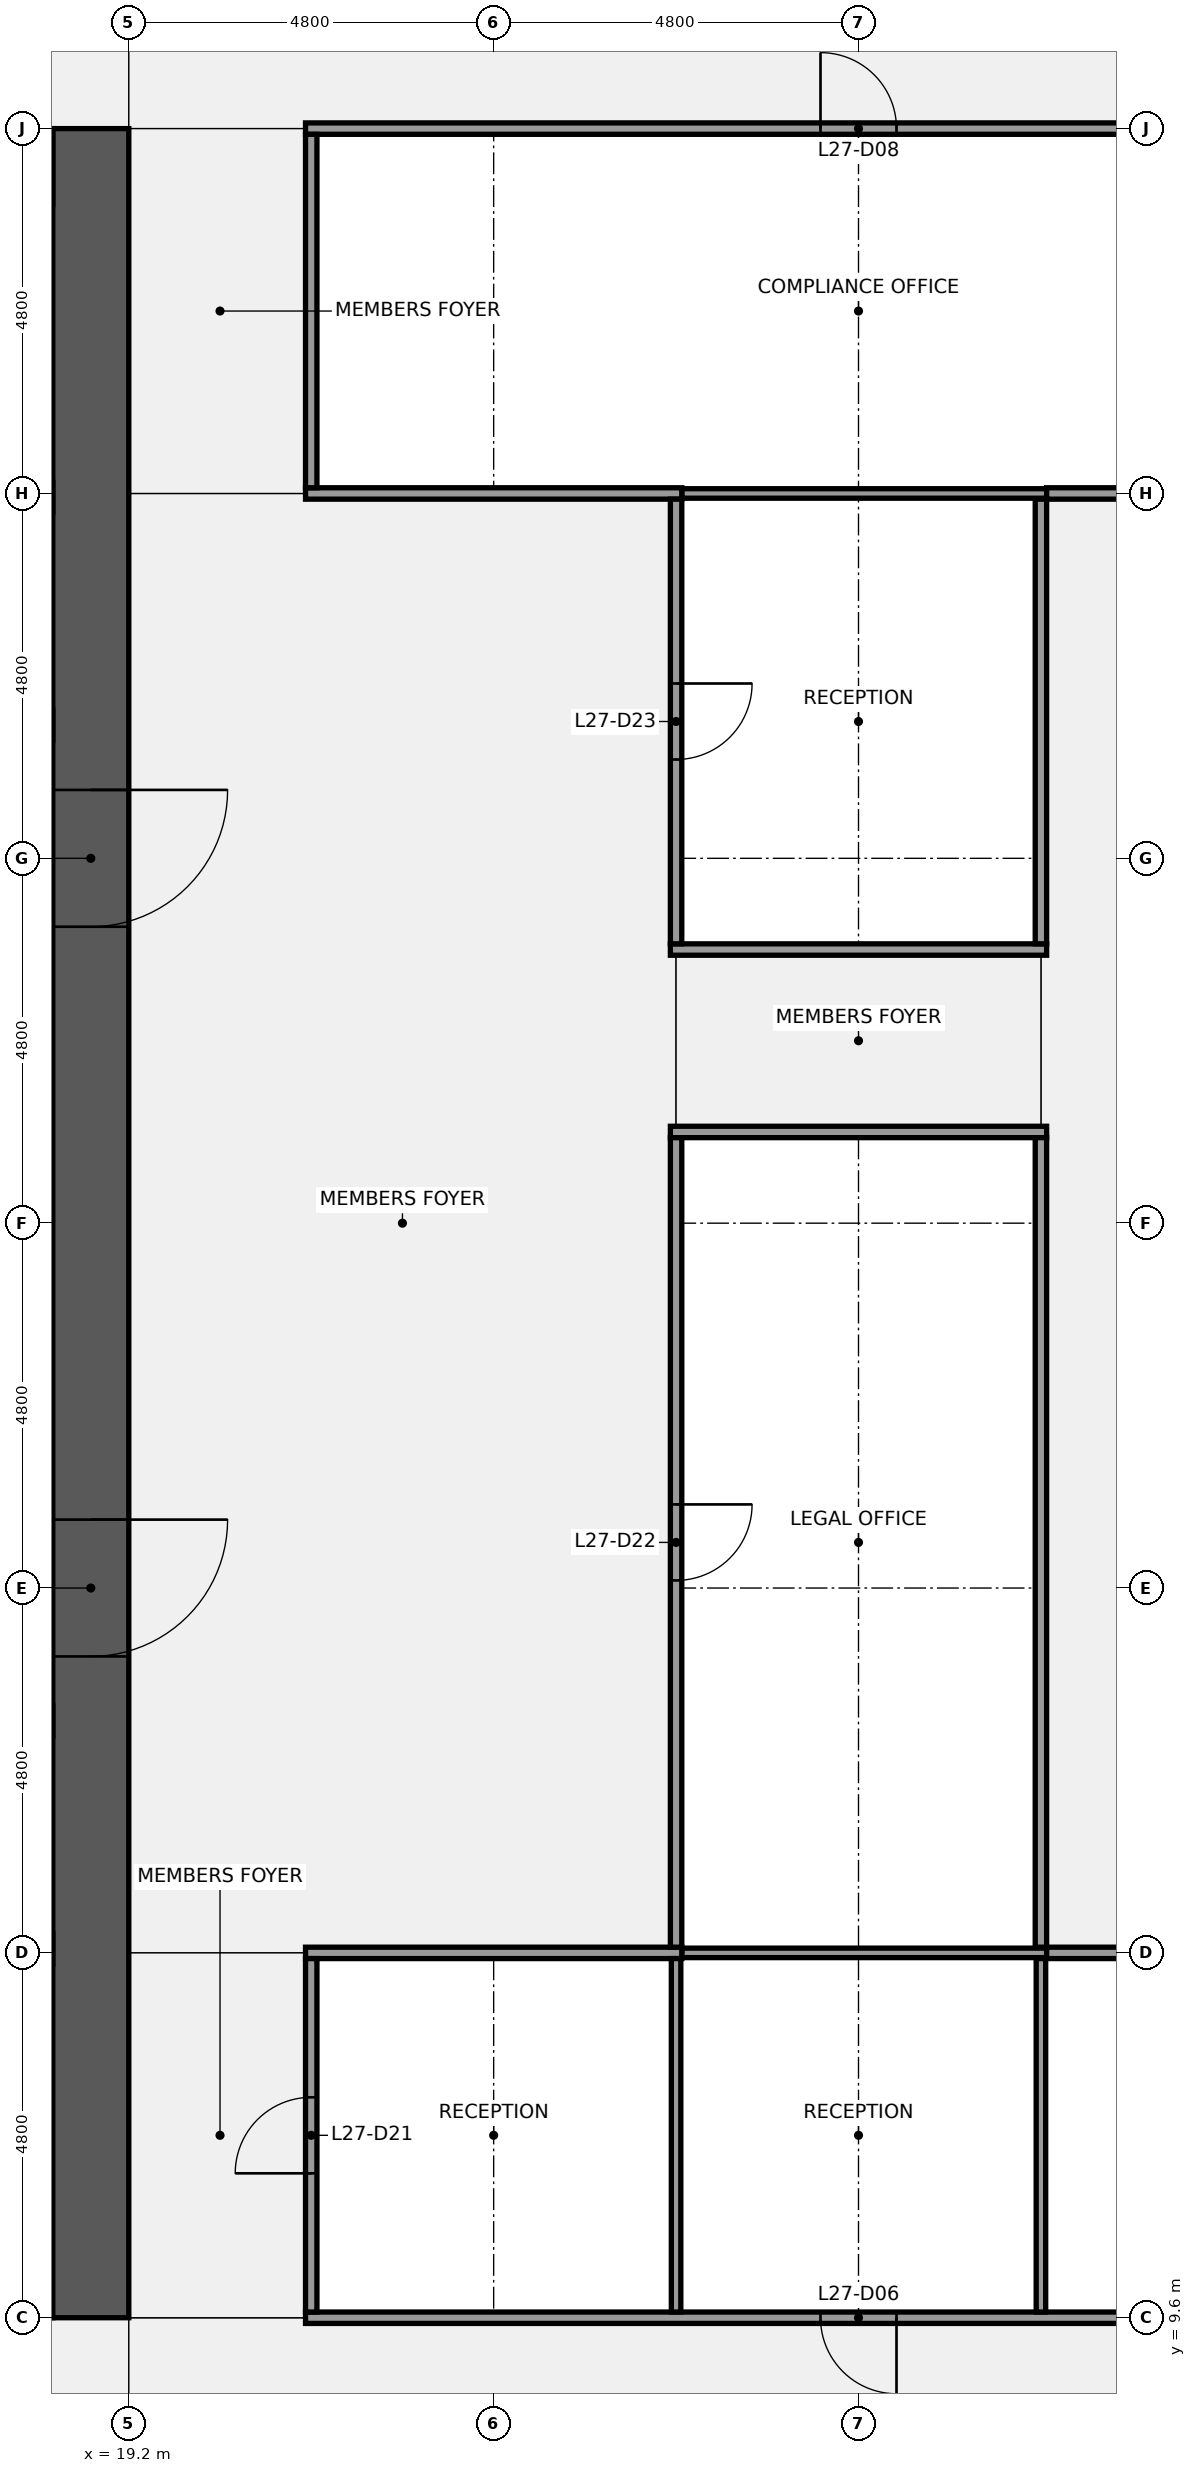
"""IFC4 building model, lengths in metres.
Left out: names, types, materials, properties, quantities, classifications, styles, units other than length and angle.
Written with IfcOpenShell. Run it as: python <this file> out.ifc"""

import sys

from ifc_helpers import new_model, si_unit, direction, frame, frame_2d, origin, place, context, subcontext, project, spatial, rectangle, extrude, element, fill, save


model = new_model("IFC4")
c1 = context("Model", 3, precision=1e-05, world=origin(), true_north=direction((0.0, 1.0)))
c2 = subcontext(c1, "Body", "Model", "MODEL_VIEW")
j1 = project(units=[si_unit("LENGTHUNIT", "METRE"), si_unit("PLANEANGLEUNIT", "RADIAN")], contexts=[c1])
p1 = place(None, origin())
s1 = spatial("IfcSite", under=j1, at=p1, CompositionType="ELEMENT")
p2 = place(p1, origin())
s2 = spatial("IfcBuilding", under=s1, at=p2, CompositionType="ELEMENT")
p3 = place(p2, frame((0.0, 0.0, 128.1)))
s3 = spatial("IfcBuildingStorey", under=s2, at=p3, CompositionType="ELEMENT", Elevation=128.1)
p4 = place(p3, frame((18.2, 10.1, 0.0), z_axis=(0.0, 0.0, 1.0), x_axis=(-1.0, 0.0, 0.0)))
e1 = element("IfcWall", 1, at=p4, inside=s3, PredefinedType="SHEAR", context=c2, shape_type="SweptSolid", body=[
    extrude(rectangle(XDim=8.6, YDim=1.0, at=frame_2d((4.3, 0.0))), origin(), (0.0, 0.0, 1.0), 3.84),
])
p5 = place(p4, frame((0.85, 0.0, 0.0)))
e2 = element("IfcOpeningElement", 2, at=p5, cuts=e1, PredefinedType="OPENING", context=c2, shape_type="SweptSolid", body=[
    extrude(rectangle(XDim=1.1, YDim=2.1, at=frame_2d((0.55, 1.05))), frame((0.0, 0.51, 0.0), z_axis=(0.0, -1.0, 0.0), x_axis=(1.0, 0.0, 0.0)), (0.0, 0.0, 1.0), 1.02),
])
p6 = place(p3, frame((18.7, 38.4, 0.0), z_axis=(0.0, 0.0, 1.0), x_axis=(0.0, -1.0, 0.0)))
e3 = element("IfcWall", 3, at=p6, inside=s3, PredefinedType="SHEAR", context=c2, shape_type="SweptSolid", body=[
    extrude(rectangle(XDim=28.8, YDim=1.0, at=frame_2d((14.4, 0.0))), origin(), (0.0, 0.0, 1.0), 3.84),
])
p7 = place(p6, frame((18.3, 0.0, 0.0)))
e4 = element("IfcOpeningElement", 4, at=p7, cuts=e3, PredefinedType="OPENING", context=c2, shape_type="SweptSolid", body=[
    extrude(rectangle(XDim=1.8, YDim=2.1, at=frame_2d((0.9, 1.05))), frame((0.0, 0.51, 0.0), z_axis=(0.0, -1.0, 0.0), x_axis=(1.0, 0.0, 0.0)), (0.0, 0.0, 1.0), 1.02),
])
p8 = place(p6, frame((8.7, 0.0, 0.0)))
e5 = element("IfcOpeningElement", 5, at=p8, cuts=e3, PredefinedType="OPENING", context=c2, shape_type="SweptSolid", body=[
    extrude(rectangle(XDim=1.8, YDim=2.1, at=frame_2d((0.9, 1.05))), frame((0.0, 0.51, 0.0), z_axis=(0.0, -1.0, 0.0), x_axis=(1.0, 0.0, 0.0)), (0.0, 0.0, 1.0), 1.02),
])
p9 = place(p3, frame((1.0, 14.45, 0.0), z_axis=(0.0, 0.0, 1.0), x_axis=(1.0, 0.0, 0.0)))
e6 = element("IfcWall", 6, at=p9, inside=s3, PredefinedType="SHEAR", context=c2, shape_type="SweptSolid", body=[
    extrude(rectangle(XDim=17.2, YDim=0.4, at=frame_2d((8.6, 0.0))), origin(), (0.0, 0.0, 1.0), 3.84),
])
p10 = place(p3, frame((1.0, 17.45, 0.0), z_axis=(0.0, 0.0, 1.0), x_axis=(1.0, 0.0, 0.0)))
e7 = element("IfcWall", 7, at=p10, inside=s3, PredefinedType="SHEAR", context=c2, shape_type="SweptSolid", body=[
    extrude(rectangle(XDim=17.2, YDim=0.4, at=frame_2d((8.6, 0.0))), origin(), (0.0, 0.0, 1.0), 3.84),
])
p11 = place(p10, frame((0.762, 0.0, 0.0)))
e8 = element("IfcOpeningElement", 8, at=p11, cuts=e7, PredefinedType="OPENING", context=c2, shape_type="SweptSolid", body=[
    extrude(rectangle(XDim=1.0, YDim=2.1, at=frame_2d((0.5, 1.05))), frame((0.0, 0.21, 0.0), z_axis=(0.0, -1.0, 0.0), x_axis=(1.0, 0.0, 0.0)), (0.0, 0.0, 1.0), 0.42),
])
p12 = place(p10, frame((4.5, 0.0, 0.0)))
e9 = element("IfcOpeningElement", 9, at=p12, cuts=e7, PredefinedType="OPENING", context=c2, shape_type="SweptSolid", body=[
    extrude(rectangle(XDim=1.0, YDim=2.1, at=frame_2d((0.5, 1.05))), frame((0.0, 0.21, 0.0), z_axis=(0.0, -1.0, 0.0), x_axis=(1.0, 0.0, 0.0)), (0.0, 0.0, 1.0), 0.42),
])
p13 = place(p10, frame((8.4, 0.0, 0.0)))
e10 = element("IfcOpeningElement", 10, at=p13, cuts=e7, PredefinedType="OPENING", context=c2, shape_type="SweptSolid", body=[
    extrude(rectangle(XDim=1.0, YDim=2.1, at=frame_2d((0.5, 1.05))), frame((0.0, 0.21, 0.0), z_axis=(0.0, -1.0, 0.0), x_axis=(1.0, 0.0, 0.0)), (0.0, 0.0, 1.0), 0.42),
])
p14 = place(p10, frame((11.4, 0.0, 0.0)))
e11 = element("IfcOpeningElement", 11, at=p14, cuts=e7, PredefinedType="OPENING", context=c2, shape_type="SweptSolid", body=[
    extrude(rectangle(XDim=1.0, YDim=2.1, at=frame_2d((0.5, 1.05))), frame((0.0, 0.21, 0.0), z_axis=(0.0, -1.0, 0.0), x_axis=(1.0, 0.0, 0.0)), (0.0, 0.0, 1.0), 0.42),
])
p15 = place(p10, frame((14.837, 0.0, 0.0)))
e12 = element("IfcOpeningElement", 12, at=p15, cuts=e7, PredefinedType="OPENING", context=c2, shape_type="SweptSolid", body=[
    extrude(rectangle(XDim=1.0, YDim=2.1, at=frame_2d((0.5, 1.05))), frame((0.0, 0.21, 0.0), z_axis=(0.0, -1.0, 0.0), x_axis=(1.0, 0.0, 0.0)), (0.0, 0.0, 1.0), 0.42),
])
p16 = place(p3, frame((1.0, 30.55, 0.0), z_axis=(0.0, 0.0, 1.0), x_axis=(1.0, 0.0, 0.0)))
e13 = element("IfcWall", 13, at=p16, inside=s3, PredefinedType="SHEAR", context=c2, shape_type="SweptSolid", body=[
    extrude(rectangle(XDim=17.2, YDim=0.4, at=frame_2d((8.6, 0.0))), origin(), (0.0, 0.0, 1.0), 3.84),
])
p17 = place(p16, frame((1.663, 0.0, 0.0)))
e14 = element("IfcOpeningElement", 14, at=p17, cuts=e13, PredefinedType="OPENING", context=c2, shape_type="SweptSolid", body=[
    extrude(rectangle(XDim=1.0, YDim=2.1, at=frame_2d((0.5, 1.05))), frame((0.0, 0.21, 0.0), z_axis=(0.0, -1.0, 0.0), x_axis=(1.0, 0.0, 0.0)), (0.0, 0.0, 1.0), 0.42),
])
p18 = place(p16, frame((5.7, 0.0, 0.0)))
e15 = element("IfcOpeningElement", 15, at=p18, cuts=e13, PredefinedType="OPENING", context=c2, shape_type="SweptSolid", body=[
    extrude(rectangle(XDim=1.0, YDim=2.1, at=frame_2d((0.5, 1.05))), frame((0.0, 0.21, 0.0), z_axis=(0.0, -1.0, 0.0), x_axis=(1.0, 0.0, 0.0)), (0.0, 0.0, 1.0), 0.42),
])
p19 = place(p16, frame((9.0, 0.0, 0.0)))
e16 = element("IfcOpeningElement", 16, at=p19, cuts=e13, PredefinedType="OPENING", context=c2, shape_type="SweptSolid", body=[
    extrude(rectangle(XDim=1.0, YDim=2.1, at=frame_2d((0.5, 1.05))), frame((0.0, 0.21, 0.0), z_axis=(0.0, -1.0, 0.0), x_axis=(1.0, 0.0, 0.0)), (0.0, 0.0, 1.0), 0.42),
])
p20 = place(p16, frame((11.7, 0.0, 0.0)))
e17 = element("IfcOpeningElement", 17, at=p20, cuts=e13, PredefinedType="OPENING", context=c2, shape_type="SweptSolid", body=[
    extrude(rectangle(XDim=1.0, YDim=2.1, at=frame_2d((0.5, 1.05))), frame((0.0, 0.21, 0.0), z_axis=(0.0, -1.0, 0.0), x_axis=(1.0, 0.0, 0.0)), (0.0, 0.0, 1.0), 0.42),
])
p21 = place(p16, frame((14.837, 0.0, 0.0)))
e18 = element("IfcOpeningElement", 18, at=p21, cuts=e13, PredefinedType="OPENING", context=c2, shape_type="SweptSolid", body=[
    extrude(rectangle(XDim=1.0, YDim=2.1, at=frame_2d((0.5, 1.05))), frame((0.0, 0.21, 0.0), z_axis=(0.0, -1.0, 0.0), x_axis=(1.0, 0.0, 0.0)), (0.0, 0.0, 1.0), 0.42),
])
p22 = place(p3, frame((1.0, 33.55, 0.0), z_axis=(0.0, 0.0, 1.0), x_axis=(1.0, 0.0, 0.0)))
e19 = element("IfcWall", 19, at=p22, inside=s3, PredefinedType="SHEAR", context=c2, shape_type="SweptSolid", body=[
    extrude(rectangle(XDim=17.2, YDim=0.4, at=frame_2d((8.6, 0.0))), origin(), (0.0, 0.0, 1.0), 3.84),
])
p23 = place(p3, frame((21.525, 9.6, 0.0), z_axis=(0.0, 0.0, 1.0), x_axis=(1.0, 0.0, 0.0)))
e20 = element("IfcWall", 20, at=p23, inside=s3, PredefinedType="PARTITIONING", context=c2, shape_type="SweptSolid", body=[
    extrude(rectangle(XDim=14.55, YDim=0.15, at=frame_2d((7.275, 0.0))), origin(), (0.0, 0.0, 1.0), 2.936),
])
p24 = place(p23, frame((6.775, 0.0, 0.0)))
e21 = element("IfcOpeningElement", 21, at=p24, cuts=e20, PredefinedType="OPENING", context=c2, shape_type="SweptSolid", body=[
    extrude(rectangle(XDim=1.0, YDim=2.1, at=frame_2d((0.5, 1.05))), frame((0.0, 0.085, 0.0), z_axis=(0.0, -1.0, 0.0), x_axis=(1.0, 0.0, 0.0)), (0.0, 0.0, 1.0), 0.17),
])
p25 = place(p23, frame((11.575, 0.0, 0.0)))
e22 = element("IfcOpeningElement", 22, at=p25, cuts=e20, PredefinedType="OPENING", context=c2, shape_type="SweptSolid", body=[
    extrude(rectangle(XDim=1.0, YDim=2.1, at=frame_2d((0.5, 1.05))), frame((0.0, 0.085, 0.0), z_axis=(0.0, -1.0, 0.0), x_axis=(1.0, 0.0, 0.0)), (0.0, 0.0, 1.0), 0.17),
])
p26 = place(p3, frame((26.475, 14.4, 0.0), z_axis=(0.0, 0.0, 1.0), x_axis=(1.0, 0.0, 0.0)))
e23 = element("IfcWall", 23, at=p26, inside=s3, PredefinedType="PARTITIONING", context=c2, shape_type="SweptSolid", body=[
    extrude(rectangle(XDim=4.8, YDim=0.125, at=frame_2d((2.4, 0.0))), origin(), (0.0, 0.0, 1.0), 2.936),
])
p27 = place(p3, frame((21.525, 14.4, 0.0), z_axis=(0.0, 0.0, 1.0), x_axis=(1.0, 0.0, 0.0)))
e24 = element("IfcWall", 24, at=p27, inside=s3, PredefinedType="PARTITIONING", context=c2, shape_type="SweptSolid", body=[
    extrude(rectangle(XDim=4.95, YDim=0.15, at=frame_2d((2.475, 0.0))), origin(), (0.0, 0.0, 1.0), 2.936),
])
p28 = place(p3, frame((31.275, 14.4, 0.0), z_axis=(0.0, 0.0, 1.0), x_axis=(1.0, 0.0, 0.0)))
e25 = element("IfcWall", 25, at=p28, inside=s3, PredefinedType="PARTITIONING", context=c2, shape_type="SweptSolid", body=[
    extrude(rectangle(XDim=4.8, YDim=0.15, at=frame_2d((2.4, 0.0))), origin(), (0.0, 0.0, 1.0), 2.936),
])
for number, where, z_axis, x_axis in (
    (26, (26.325, 25.2, 0.0), (0.0, 0.0, 1.0), (1.0, 0.0, 0.0)),
    (27, (26.325, 27.6, 0.0), (0.0, 0.0, 1.0), (1.0, 0.0, 0.0)),
):
    element("IfcWall", number, at=place(p3, frame(where, z_axis=z_axis, x_axis=x_axis)), inside=s3, PredefinedType="PARTITIONING", context=c2, shape_type="SweptSolid", body=[
        extrude(rectangle(XDim=4.95, YDim=0.15, at=frame_2d((2.475, 0.0))), origin(), (0.0, 0.0, 1.0), 2.936),
    ])
p29 = place(p3, frame((26.475, 33.6, 0.0), z_axis=(0.0, 0.0, 1.0), x_axis=(1.0, 0.0, 0.0)))
e28 = element("IfcWall", 28, at=p29, inside=s3, PredefinedType="PARTITIONING", context=c2, shape_type="SweptSolid", body=[
    extrude(rectangle(XDim=4.8, YDim=0.125, at=frame_2d((2.4, 0.0))), origin(), (0.0, 0.0, 1.0), 2.936),
])
p30 = place(p3, frame((21.525, 33.6, 0.0), z_axis=(0.0, 0.0, 1.0), x_axis=(1.0, 0.0, 0.0)))
e29 = element("IfcWall", 29, at=p30, inside=s3, PredefinedType="PARTITIONING", context=c2, shape_type="SweptSolid", body=[
    extrude(rectangle(XDim=4.95, YDim=0.15, at=frame_2d((2.475, 0.0))), origin(), (0.0, 0.0, 1.0), 2.936),
])
p31 = place(p3, frame((31.275, 33.6, 0.0), z_axis=(0.0, 0.0, 1.0), x_axis=(1.0, 0.0, 0.0)))
e30 = element("IfcWall", 30, at=p31, inside=s3, PredefinedType="PARTITIONING", context=c2, shape_type="SweptSolid", body=[
    extrude(rectangle(XDim=4.8, YDim=0.15, at=frame_2d((2.4, 0.0))), origin(), (0.0, 0.0, 1.0), 2.936),
])
p32 = place(p3, frame((21.525, 38.4, 0.0), z_axis=(0.0, 0.0, 1.0), x_axis=(1.0, 0.0, 0.0)))
e31 = element("IfcWall", 31, at=p32, inside=s3, PredefinedType="PARTITIONING", context=c2, shape_type="SweptSolid", body=[
    extrude(rectangle(XDim=14.55, YDim=0.15, at=frame_2d((7.275, 0.0))), origin(), (0.0, 0.0, 1.0), 2.936),
])
p33 = place(p32, frame((6.775, 0.0, 0.0)))
e32 = element("IfcOpeningElement", 32, at=p33, cuts=e31, PredefinedType="OPENING", context=c2, shape_type="SweptSolid", body=[
    extrude(rectangle(XDim=1.0, YDim=2.1, at=frame_2d((0.5, 1.05))), frame((0.0, 0.085, 0.0), z_axis=(0.0, -1.0, 0.0), x_axis=(1.0, 0.0, 0.0)), (0.0, 0.0, 1.0), 0.17),
])
p34 = place(p3, frame((21.6, 9.675, 0.0), z_axis=(0.0, 0.0, 1.0), x_axis=(0.0, 1.0, 0.0)))
e33 = element("IfcWall", 33, at=p34, inside=s3, PredefinedType="PARTITIONING", context=c2, shape_type="SweptSolid", body=[
    extrude(rectangle(XDim=4.65, YDim=0.15, at=frame_2d((2.325, 0.0))), origin(), (0.0, 0.0, 1.0), 2.936),
])
p35 = place(p34, frame((1.825, 0.0, 0.0)))
e34 = element("IfcOpeningElement", 34, at=p35, cuts=e33, PredefinedType="OPENING", context=c2, shape_type="SweptSolid", body=[
    extrude(rectangle(XDim=1.0, YDim=2.1, at=frame_2d((0.5, 1.05))), frame((0.0, 0.085, 0.0), z_axis=(0.0, -1.0, 0.0), x_axis=(1.0, 0.0, 0.0)), (0.0, 0.0, 1.0), 0.17),
])
p36 = place(p3, frame((21.6, 33.675, 0.0), z_axis=(0.0, 0.0, 1.0), x_axis=(0.0, 1.0, 0.0)))
e35 = element("IfcWall", 35, at=p36, inside=s3, PredefinedType="PARTITIONING", context=c2, shape_type="SweptSolid", body=[
    extrude(rectangle(XDim=4.65, YDim=0.15, at=frame_2d((2.325, 0.0))), origin(), (0.0, 0.0, 1.0), 2.936),
])
p37 = place(p3, frame((26.4, 9.675, 0.0), z_axis=(0.0, 0.0, 1.0), x_axis=(0.0, 1.0, 0.0)))
e36 = element("IfcWall", 36, at=p37, inside=s3, PredefinedType="PARTITIONING", context=c2, shape_type="SweptSolid", body=[
    extrude(rectangle(XDim=4.65, YDim=0.125, at=frame_2d((2.325, 0.0))), origin(), (0.0, 0.0, 1.0), 2.936),
])
p38 = place(p3, frame((26.4, 14.475, 0.0), z_axis=(0.0, 0.0, 1.0), x_axis=(0.0, 1.0, 0.0)))
e37 = element("IfcWall", 37, at=p38, inside=s3, PredefinedType="PARTITIONING", context=c2, shape_type="SweptSolid", body=[
    extrude(rectangle(XDim=10.65, YDim=0.15, at=frame_2d((5.325, 0.0))), origin(), (0.0, 0.0, 1.0), 2.936),
])
p39 = place(p38, frame((4.825, 0.0, 0.0)))
e38 = element("IfcOpeningElement", 38, at=p39, cuts=e37, PredefinedType="OPENING", context=c2, shape_type="SweptSolid", body=[
    extrude(rectangle(XDim=1.0, YDim=2.1, at=frame_2d((0.5, 1.05))), frame((0.0, 0.085, 0.0), z_axis=(0.0, -1.0, 0.0), x_axis=(1.0, 0.0, 0.0)), (0.0, 0.0, 1.0), 0.17),
])
p40 = place(p3, frame((26.4, 27.675, 0.0), z_axis=(0.0, 0.0, 1.0), x_axis=(0.0, 1.0, 0.0)))
e39 = element("IfcWall", 39, at=p40, inside=s3, PredefinedType="PARTITIONING", context=c2, shape_type="SweptSolid", body=[
    extrude(rectangle(XDim=5.85, YDim=0.15, at=frame_2d((2.925, 0.0))), origin(), (0.0, 0.0, 1.0), 2.936),
])
p41 = place(p40, frame((2.425, 0.0, 0.0)))
e40 = element("IfcOpeningElement", 40, at=p41, cuts=e39, PredefinedType="OPENING", context=c2, shape_type="SweptSolid", body=[
    extrude(rectangle(XDim=1.0, YDim=2.1, at=frame_2d((0.5, 1.05))), frame((0.0, 0.085, 0.0), z_axis=(0.0, -1.0, 0.0), x_axis=(1.0, 0.0, 0.0)), (0.0, 0.0, 1.0), 0.17),
])
p42 = place(p3, frame((31.2, 9.675, 0.0), z_axis=(0.0, 0.0, 1.0), x_axis=(0.0, 1.0, 0.0)))
e41 = element("IfcWall", 41, at=p42, inside=s3, PredefinedType="PARTITIONING", context=c2, shape_type="SweptSolid", body=[
    extrude(rectangle(XDim=4.65, YDim=0.125, at=frame_2d((2.325, 0.0))), origin(), (0.0, 0.0, 1.0), 2.936),
])
p43 = place(p3, frame((31.2, 14.475, 0.0), z_axis=(0.0, 0.0, 1.0), x_axis=(0.0, 1.0, 0.0)))
e42 = element("IfcWall", 42, at=p43, inside=s3, PredefinedType="PARTITIONING", context=c2, shape_type="SweptSolid", body=[
    extrude(rectangle(XDim=10.65, YDim=0.15, at=frame_2d((5.325, 0.0))), origin(), (0.0, 0.0, 1.0), 2.936),
])
p44 = place(p3, frame((31.2, 27.675, 0.0), z_axis=(0.0, 0.0, 1.0), x_axis=(0.0, 1.0, 0.0)))
e43 = element("IfcWall", 43, at=p44, inside=s3, PredefinedType="PARTITIONING", context=c2, shape_type="SweptSolid", body=[
    extrude(rectangle(XDim=5.85, YDim=0.15, at=frame_2d((2.925, 0.0))), origin(), (0.0, 0.0, 1.0), 2.936),
])
p45 = place(p7, origin())
e44 = element("IfcDoor", 44, at=p45, inside=s3, OperationType="DOUBLE_DOOR_SINGLE_SWING", PredefinedType="DOOR", context=c2, shape_type="SweptSolid", body=[
    extrude(rectangle(XDim=1.8, YDim=2.1, at=frame_2d((0.9, 1.05))), frame((0.0, 0.025, 0.0), z_axis=(0.0, -1.0, 0.0), x_axis=(1.0, 0.0, 0.0)), (0.0, 0.0, 1.0), 0.05),
])
fill(e4, e44)
p46 = place(p8, origin())
e45 = element("IfcDoor", 45, at=p46, inside=s3, OperationType="DOUBLE_DOOR_SINGLE_SWING", PredefinedType="DOOR", context=c2, shape_type="SweptSolid", body=[
    extrude(rectangle(XDim=1.8, YDim=2.1, at=frame_2d((0.9, 1.05))), frame((0.0, 0.025, 0.0), z_axis=(0.0, -1.0, 0.0), x_axis=(1.0, 0.0, 0.0)), (0.0, 0.0, 1.0), 0.05),
])
fill(e5, e45)
p47 = place(p24, origin())
e46 = element("IfcDoor", 46, at=p47, inside=s3, OperationType="SINGLE_SWING_RIGHT", PredefinedType="DOOR", context=c2, shape_type="SweptSolid", body=[
    extrude(rectangle(XDim=1.0, YDim=2.1, at=frame_2d((0.5, 1.05))), frame((0.0, 0.025, 0.0), z_axis=(0.0, -1.0, 0.0), x_axis=(1.0, 0.0, 0.0)), (0.0, 0.0, 1.0), 0.05),
])
fill(e21, e46)
p48 = place(p33, origin())
e47 = element("IfcDoor", 47, at=p48, inside=s3, OperationType="SINGLE_SWING_LEFT", PredefinedType="DOOR", context=c2, shape_type="SweptSolid", body=[
    extrude(rectangle(XDim=1.0, YDim=2.1, at=frame_2d((0.5, 1.05))), frame((0.0, 0.025, 0.0), z_axis=(0.0, -1.0, 0.0), x_axis=(1.0, 0.0, 0.0)), (0.0, 0.0, 1.0), 0.05),
])
fill(e32, e47)
p49 = place(p35, origin())
e48 = element("IfcDoor", 48, at=p49, inside=s3, OperationType="SINGLE_SWING_LEFT", PredefinedType="DOOR", context=c2, shape_type="SweptSolid", body=[
    extrude(rectangle(XDim=1.0, YDim=2.1, at=frame_2d((0.5, 1.05))), frame((0.0, 0.025, 0.0), z_axis=(0.0, -1.0, 0.0), x_axis=(1.0, 0.0, 0.0)), (0.0, 0.0, 1.0), 0.05),
])
fill(e34, e48)
p50 = place(p39, origin())
e49 = element("IfcDoor", 49, at=p50, inside=s3, OperationType="SINGLE_SWING_RIGHT", PredefinedType="DOOR", context=c2, shape_type="SweptSolid", body=[
    extrude(rectangle(XDim=1.0, YDim=2.1, at=frame_2d((0.5, 1.05))), frame((0.0, 0.025, 0.0), z_axis=(0.0, -1.0, 0.0), x_axis=(1.0, 0.0, 0.0)), (0.0, 0.0, 1.0), 0.05),
])
fill(e38, e49)
p51 = place(p41, origin())
e50 = element("IfcDoor", 50, at=p51, inside=s3, OperationType="SINGLE_SWING_RIGHT", PredefinedType="DOOR", context=c2, shape_type="SweptSolid", body=[
    extrude(rectangle(XDim=1.0, YDim=2.1, at=frame_2d((0.5, 1.05))), frame((0.0, 0.025, 0.0), z_axis=(0.0, -1.0, 0.0), x_axis=(1.0, 0.0, 0.0)), (0.0, 0.0, 1.0), 0.05),
])
fill(e40, e50)
save(model, sys.argv[1])
